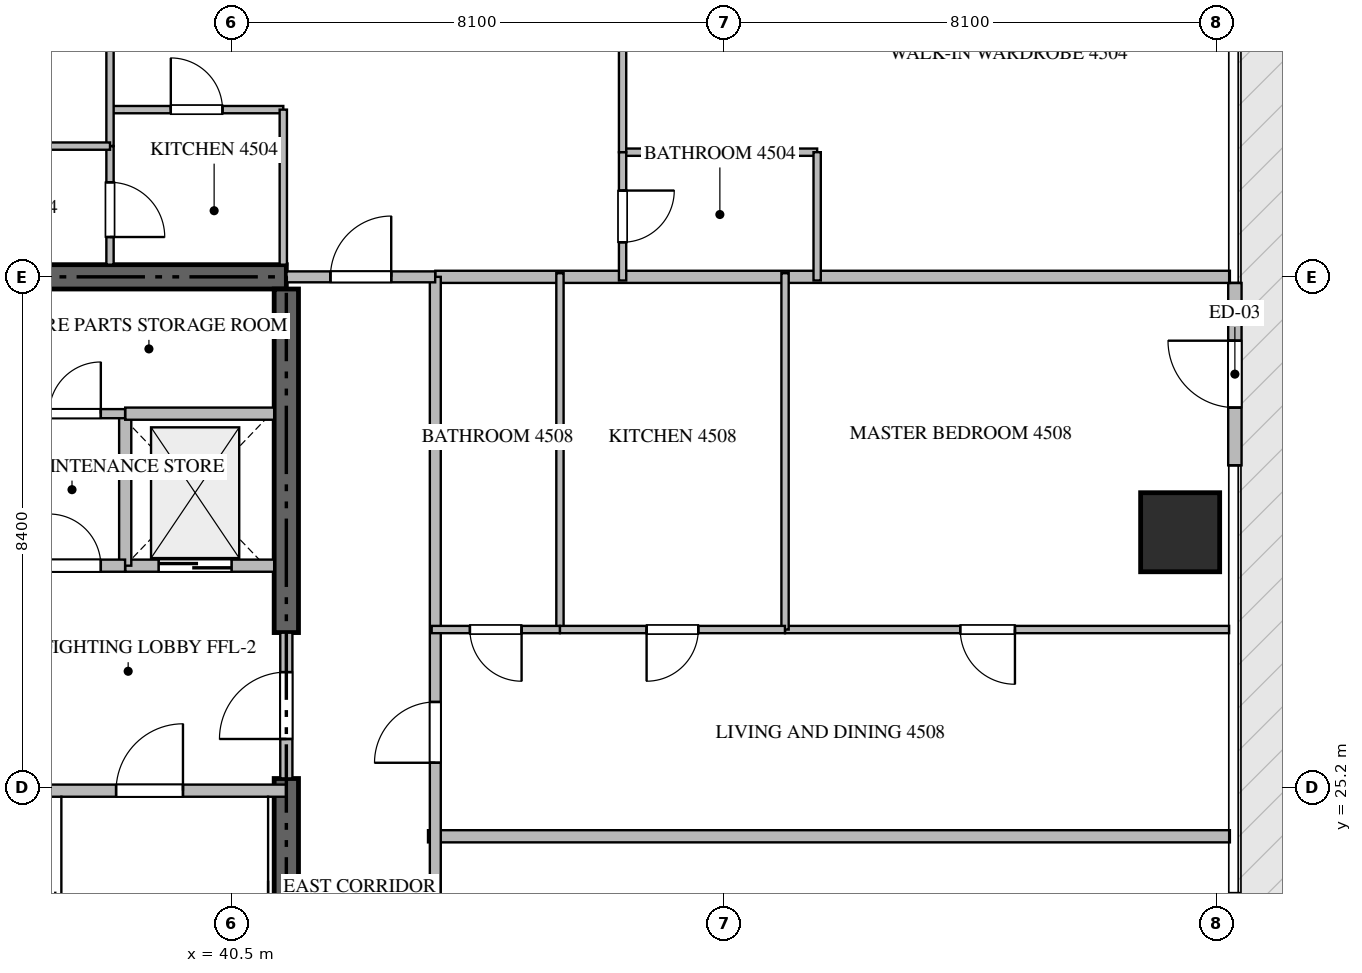
"""IFC4 building model, lengths in metres.
Left out: names, types, materials, properties, quantities, classifications, styles, units other than length and angle.
Written with IfcOpenShell. Run it as: python <this file> out.ifc"""

import sys

from ifc_helpers import new_model, si_unit, direction, frame, frame_2d, origin, origin_2d, place, context, subcontext, project, spatial, rectangle, extrude, source, transform, mapped, element, fill, save


model = new_model("IFC4")
c1 = context("Model", 3, precision=1e-05, world=origin(), true_north=direction((0.0, 1.0)))
c2 = subcontext(c1, "Body", "Model", "MODEL_VIEW")
j1 = project(units=[si_unit("LENGTHUNIT", "METRE"), si_unit("PLANEANGLEUNIT", "RADIAN")], contexts=[c1])
p1 = place(None, origin())
s1 = spatial("IfcSite", under=j1, at=p1, CompositionType="ELEMENT")
p2 = place(p1, origin())
s2 = spatial("IfcBuilding", under=s1, at=p2, CompositionType="ELEMENT")
p3 = place(p2, frame((0.0, 0.0, 180.15)))
s3 = spatial("IfcBuildingStorey", under=s2, at=p3, CompositionType="ELEMENT", Elevation=180.15)
p4 = place(p3, frame((41.4, 33.6, -0.26), z_axis=(0.0, 0.0, 1.0), x_axis=(-1.0, 0.0, 0.0)))
e1 = element("IfcWall", 1, at=p4, inside=s3, PredefinedType="SHEAR", context=c2, shape_type="SweptSolid", body=[
    extrude(rectangle(XDim=18.0, YDim=0.4, at=frame_2d((9.0, 0.0))), origin(), (0.0, 0.0, 1.0), 3.748),
])
p5 = place(p3, frame((41.4, 17.0, -0.26), z_axis=(0.0, 0.0, 1.0), x_axis=(0.0, 1.0, 0.0)))
e2 = element("IfcWall", 2, at=p5, inside=s3, PredefinedType="SHEAR", context=c2, shape_type="SweptSolid", body=[
    extrude(rectangle(XDim=8.35, YDim=0.4, at=frame_2d((4.175, 0.0))), origin(), (0.0, 0.0, 1.0), 3.748),
])
p6 = place(p3, frame((41.4, 27.75, -0.26), z_axis=(0.0, 0.0, 1.0), x_axis=(0.0, 1.0, 0.0)))
e3 = element("IfcWall", 3, at=p6, inside=s3, PredefinedType="SHEAR", context=c2, shape_type="SweptSolid", body=[
    extrude(rectangle(XDim=5.65, YDim=0.4, at=frame_2d((2.825, 0.0))), origin(), (0.0, 0.0, 1.0), 3.748),
])
m1 = source(origin(), c2, "Body", "SweptSolid", [
    extrude(rectangle(XDim=1.3, YDim=1.3, at=origin_2d()), origin(), (0.0, 0.0, 1.0), 3.75),
])
p7 = place(p3, frame((56.1, 29.4, -0.26), z_axis=(0.0, 0.0, 1.0), x_axis=(1.0, 0.0, 0.0)))
e4 = element("IfcColumn", 4, at=p7, inside=s3, PredefinedType="COLUMN", context=c2, shape_type="MappedRepresentation", body=[
    mapped(m1, transform((0.0, 0.0, 0.0), scale=1.0)),
])
p8 = place(p3, frame((57.0, 30.5, 0.0), z_axis=(0.0, 0.0, 1.0), x_axis=(0.0, 1.0, 0.0)))
e5 = element("IfcWall", 5, at=p8, inside=s3, PredefinedType="ELEMENTEDWALL", context=c2, shape_type="SweptSolid", body=[
    extrude(rectangle(XDim=3.0, YDim=0.22, at=frame_2d((1.5, 0.0))), origin(), (0.0, 0.0, 1.0), 3.475),
])
p9 = place(p8, frame((0.95, 0.0, 0.0)))
e6 = element("IfcOpeningElement", 6, at=p9, cuts=e5, PredefinedType="OPENING", context=c2, shape_type="SweptSolid", body=[
    extrude(rectangle(XDim=1.1, YDim=2.2, at=frame_2d((0.55, 1.1))), frame((0.0, 0.12, 0.0), z_axis=(0.0, -1.0, 0.0), x_axis=(1.0, 0.0, 0.0)), (0.0, 0.0, 1.0), 0.24),
])
p10 = place(p3, frame((36.95, 25.15, 0.0), z_axis=(0.0, 0.0, 1.0), x_axis=(1.0, 0.0, 0.0)))
e7 = element("IfcWall", 7, at=p10, inside=s3, PredefinedType="STANDARD", context=c2, shape_type="SweptSolid", body=[
    extrude(rectangle(XDim=4.45, YDim=0.2, at=frame_2d((2.225, 0.0))), origin(), (0.0, 0.0, 1.0), 3.49),
])
p11 = place(p10, frame((1.65, 0.0, 0.0)))
e8 = element("IfcOpeningElement", 8, at=p11, cuts=e7, PredefinedType="OPENING", context=c2, shape_type="SweptSolid", body=[
    extrude(rectangle(XDim=1.1, YDim=2.15, at=frame_2d((0.55, 1.075))), frame((0.0, 0.11, 0.0), z_axis=(0.0, -1.0, 0.0), x_axis=(1.0, 0.0, 0.0)), (0.0, 0.0, 1.0), 0.22),
])
p12 = place(p3, frame((38.75, 28.85, 0.0), z_axis=(0.0, 0.0, 1.0), x_axis=(1.0, 0.0, 0.0)))
e9 = element("IfcWall", 9, at=p12, inside=s3, PredefinedType="STANDARD", context=c2, shape_type="SweptSolid", body=[
    extrude(rectangle(XDim=2.45, YDim=0.2, at=frame_2d((1.225, 0.0))), origin(), (0.0, 0.0, 1.0), 3.49),
])
p13 = place(p12, frame((0.55, 0.0, 0.0)))
e10 = element("IfcOpeningElement", 10, at=p13, cuts=e9, PredefinedType="OPENING", context=c2, shape_type="SweptSolid", body=[
    extrude(rectangle(XDim=1.2, YDim=2.2, at=frame_2d((0.6, 1.1))), frame((0.0, 0.11, 0.0), z_axis=(0.0, -1.0, 0.0), x_axis=(1.0, 0.0, 0.0)), (0.0, 0.0, 1.0), 0.22),
])
p14 = place(p3, frame((38.75, 28.85, 0.0), z_axis=(0.0, 0.0, 1.0), x_axis=(0.0, 1.0, 0.0)))
e11 = element("IfcWall", 11, at=p14, inside=s3, PredefinedType="STANDARD", context=c2, shape_type="SweptSolid", body=[
    extrude(rectangle(XDim=2.5, YDim=0.2, at=frame_2d((1.25, 0.0))), origin(), (0.0, 0.0, 1.0), 3.49),
])
p15 = place(p3, frame((38.75, 31.35, 0.0), z_axis=(0.0, 0.0, 1.0), x_axis=(1.0, 0.0, 0.0)))
e12 = element("IfcWall", 12, at=p15, inside=s3, PredefinedType="STANDARD", context=c2, shape_type="SweptSolid", body=[
    extrude(rectangle(XDim=2.45, YDim=0.2, at=frame_2d((1.225, 0.0))), origin(), (0.0, 0.0, 1.0), 3.49),
])
p16 = place(p3, frame((37.1, 28.85, 0.0), z_axis=(0.0, 0.0, 1.0), x_axis=(1.0, 0.0, 0.0)))
e13 = element("IfcWall", 13, at=p16, inside=s3, PredefinedType="STANDARD", context=c2, shape_type="SweptSolid", body=[
    extrude(rectangle(XDim=1.648, YDim=0.2, at=frame_2d((0.824, 0.0))), origin(), (0.0, 0.0, 1.0), 3.49),
])
p17 = place(p16, frame((0.399, 0.0, 0.0)))
e14 = element("IfcOpeningElement", 14, at=p17, cuts=e13, PredefinedType="OPENING", context=c2, shape_type="SweptSolid", body=[
    extrude(rectangle(XDim=0.85, YDim=2.1, at=frame_2d((0.425, 1.05))), frame((0.0, 0.11, 0.0), z_axis=(0.0, -1.0, 0.0), x_axis=(1.0, 0.0, 0.0)), (0.0, 0.0, 1.0), 0.22),
])
p18 = place(p3, frame((41.4, 25.352, 0.0), z_axis=(0.0, 0.0, 1.0), x_axis=(0.0, 1.0, 0.0)))
e15 = element("IfcWall", 15, at=p18, inside=s3, PredefinedType="STANDARD", context=c2, shape_type="SweptSolid", body=[
    extrude(rectangle(XDim=2.396, YDim=0.2, at=frame_2d((1.198, 0.0))), origin(), (0.0, 0.0, 1.0), 3.49),
])
p19 = place(p18, frame((0.648, 0.0, 0.0)))
e16 = element("IfcOpeningElement", 16, at=p19, cuts=e15, PredefinedType="OPENING", context=c2, shape_type="SweptSolid", body=[
    extrude(rectangle(XDim=1.1, YDim=2.15, at=frame_2d((0.55, 1.075))), frame((0.0, 0.11, 0.0), z_axis=(0.0, -1.0, 0.0), x_axis=(1.0, 0.0, 0.0)), (0.0, 0.0, 1.0), 0.22),
])
p20 = place(p3, frame((37.1, 31.35, 0.0), z_axis=(0.0, 0.0, 1.0), x_axis=(1.0, 0.0, 0.0)))
e17 = element("IfcWall", 17, at=p20, inside=s3, PredefinedType="PARTITIONING", context=c2, shape_type="SweptSolid", body=[
    extrude(rectangle(XDim=1.648, YDim=0.15, at=frame_2d((0.824, 0.0))), origin(), (0.0, 0.0, 1.0), 3.49),
])
p21 = place(p20, frame((0.399, 0.0, 0.0)))
e18 = element("IfcOpeningElement", 18, at=p21, cuts=e17, PredefinedType="OPENING", context=c2, shape_type="SweptSolid", body=[
    extrude(rectangle(XDim=0.85, YDim=2.1, at=frame_2d((0.425, 1.05))), frame((0.0, 0.085, 0.0), z_axis=(0.0, -1.0, 0.0), x_axis=(1.0, 0.0, 0.0)), (0.0, 0.0, 1.0), 0.17),
])
p22 = place(p3, frame((43.73, 24.4, 0.0), z_axis=(0.0, 0.0, 1.0), x_axis=(1.0, 0.0, 0.0)))
e19 = element("IfcWall", 19, at=p22, inside=s3, PredefinedType="PARTITIONING", context=c2, shape_type="SweptSolid", body=[
    extrude(rectangle(XDim=13.188, YDim=0.2, at=frame_2d((6.594, 0.0))), origin(), (0.0, 0.0, 1.0), 3.49),
])
p23 = place(p3, frame((43.85, 33.6, 0.0), z_axis=(0.0, 0.0, 1.0), x_axis=(1.0, 0.0, 0.0)))
e20 = element("IfcWall", 20, at=p23, inside=s3, PredefinedType="PARTITIONING", context=c2, shape_type="SweptSolid", body=[
    extrude(rectangle(XDim=13.068, YDim=0.2, at=frame_2d((6.534, 0.0))), origin(), (0.0, 0.0, 1.0), 3.49),
])
p24 = place(p3, frame((43.85, 14.9, 0.0), z_axis=(0.0, 0.0, 1.0), x_axis=(0.0, 1.0, 0.0)))
e21 = element("IfcWall", 21, at=p24, inside=s3, PredefinedType="PARTITIONING", context=c2, shape_type="SweptSolid", body=[
    extrude(rectangle(XDim=18.7, YDim=0.18, at=frame_2d((9.35, 0.0))), origin(), (0.0, 0.0, 1.0), 3.49),
])
p25 = place(p24, frame((5.629, 0.0, 0.0)))
e22 = element("IfcOpeningElement", 22, at=p25, cuts=e21, PredefinedType="OPENING", context=c2, shape_type="SweptSolid", body=[
    extrude(rectangle(XDim=1.0, YDim=2.15, at=frame_2d((0.5, 1.075))), frame((0.0, 0.1, 0.0), z_axis=(0.0, -1.0, 0.0), x_axis=(1.0, 0.0, 0.0)), (0.0, 0.0, 1.0), 0.2),
])
p26 = place(p24, frame((10.709, 0.0, 0.0)))
e23 = element("IfcOpeningElement", 23, at=p26, cuts=e21, PredefinedType="OPENING", context=c2, shape_type="SweptSolid", body=[
    extrude(rectangle(XDim=1.0, YDim=2.15, at=frame_2d((0.5, 1.075))), frame((0.0, 0.1, 0.0), z_axis=(0.0, -1.0, 0.0), x_axis=(1.0, 0.0, 0.0)), (0.0, 0.0, 1.0), 0.2),
])
p27 = place(p3, frame((41.402, 33.6, 0.0), z_axis=(0.0, 0.0, 1.0), x_axis=(1.0, 0.0, 0.0)))
e24 = element("IfcWall", 24, at=p27, inside=s3, PredefinedType="PARTITIONING", context=c2, shape_type="SweptSolid", body=[
    extrude(rectangle(XDim=2.446, YDim=0.18, at=frame_2d((1.223, 0.0))), origin(), (0.0, 0.0, 1.0), 3.49),
])
p28 = place(p27, frame((0.723, 0.0, 0.0)))
e25 = element("IfcOpeningElement", 25, at=p28, cuts=e24, PredefinedType="OPENING", context=c2, shape_type="SweptSolid", body=[
    extrude(rectangle(XDim=1.0, YDim=2.15, at=frame_2d((0.5, 1.075))), frame((0.0, 0.1, 0.0), z_axis=(0.0, -1.0, 0.0), x_axis=(1.0, 0.0, 0.0)), (0.0, 0.0, 1.0), 0.2),
])
p29 = place(p3, frame((38.5, 36.35, 0.0), z_axis=(0.0, 0.0, 1.0), x_axis=(1.0, 0.0, 0.0)))
e26 = element("IfcWall", 26, at=p29, inside=s3, PredefinedType="PARTITIONING", context=c2, shape_type="SweptSolid", body=[
    extrude(rectangle(XDim=2.85, YDim=0.12, at=frame_2d((1.425, 0.0))), origin(), (0.0, 0.0, 1.0), 3.49),
])
p30 = place(p29, frame((1.0, 0.0, 0.0)))
e27 = element("IfcOpeningElement", 27, at=p30, cuts=e26, PredefinedType="OPENING", context=c2, shape_type="SweptSolid", body=[
    extrude(rectangle(XDim=0.85, YDim=2.1, at=frame_2d((0.425, 1.05))), frame((0.0, 0.07, 0.0), z_axis=(0.0, -1.0, 0.0), x_axis=(1.0, 0.0, 0.0)), (0.0, 0.0, 1.0), 0.14),
])
p31 = place(p3, frame((41.35, 36.35, 0.0), z_axis=(0.0, 0.0, 1.0), x_axis=(0.0, -1.0, 0.0)))
e28 = element("IfcWall", 28, at=p31, inside=s3, PredefinedType="PARTITIONING", context=c2, shape_type="SweptSolid", body=[
    extrude(rectangle(XDim=2.55, YDim=0.12, at=frame_2d((1.275, 0.0))), origin(), (0.0, 0.0, 1.0), 3.49),
])
p32 = place(p3, frame((38.5, 35.75, 0.0), z_axis=(0.0, 0.0, 1.0), x_axis=(0.0, -1.0, 0.0)))
e29 = element("IfcWall", 29, at=p32, inside=s3, PredefinedType="PARTITIONING", context=c2, shape_type="SweptSolid", body=[
    extrude(rectangle(XDim=1.95, YDim=0.12, at=frame_2d((0.975, 0.0))), origin(), (0.0, 0.0, 1.0), 3.49),
])
p33 = place(p32, frame((0.595, 0.0, 0.0)))
e30 = element("IfcOpeningElement", 30, at=p33, cuts=e29, PredefinedType="OPENING", context=c2, shape_type="SweptSolid", body=[
    extrude(rectangle(XDim=0.9, YDim=2.1, at=frame_2d((0.45, 1.05))), frame((0.0, 0.07, 0.0), z_axis=(0.0, -1.0, 0.0), x_axis=(1.0, 0.0, 0.0)), (0.0, 0.0, 1.0), 0.14),
])
p34 = place(p3, frame((38.5, 42.335, 0.0), z_axis=(0.0, 0.0, 1.0), x_axis=(0.0, -1.0, 0.0)))
e31 = element("IfcWall", 31, at=p34, inside=s3, PredefinedType="PARTITIONING", context=c2, shape_type="SweptSolid", body=[
    extrude(rectangle(XDim=6.583, YDim=0.12, at=frame_2d((3.292, 0.0))), origin(), (0.0, 0.0, 1.0), 3.49),
])
p35 = place(p3, frame((35.452, 35.75, 0.0), z_axis=(0.0, 0.0, 1.0), x_axis=(1.0, 0.0, 0.0)))
e32 = element("IfcWall", 32, at=p35, inside=s3, PredefinedType="PARTITIONING", context=c2, shape_type="SweptSolid", body=[
    extrude(rectangle(XDim=3.048, YDim=0.12, at=frame_2d((1.524, 0.0))), origin(), (0.0, 0.0, 1.0), 3.49),
])
p36 = place(p35, frame((1.099, 0.0, 0.0)))
e33 = element("IfcOpeningElement", 33, at=p36, cuts=e32, PredefinedType="OPENING", context=c2, shape_type="SweptSolid", body=[
    extrude(rectangle(XDim=0.85, YDim=2.1, at=frame_2d((0.425, 1.05))), frame((0.0, 0.07, 0.0), z_axis=(0.0, -1.0, 0.0), x_axis=(1.0, 0.0, 0.0)), (0.0, 0.0, 1.0), 0.14),
])
p37 = place(p3, frame((46.93, 35.65, 0.0), z_axis=(0.0, 0.0, 1.0), x_axis=(1.0, 0.0, 0.0)))
e34 = element("IfcWall", 34, at=p37, inside=s3, PredefinedType="PARTITIONING", context=c2, shape_type="SweptSolid", body=[
    extrude(rectangle(XDim=3.2, YDim=0.12, at=frame_2d((1.6, 0.0))), origin(), (0.0, 0.0, 1.0), 3.49),
])
p38 = place(p3, frame((50.13, 35.65, 0.0), z_axis=(0.0, 0.0, 1.0), x_axis=(0.0, -1.0, 0.0)))
e35 = element("IfcWall", 35, at=p38, inside=s3, PredefinedType="PARTITIONING", context=c2, shape_type="SweptSolid", body=[
    extrude(rectangle(XDim=2.11, YDim=0.12, at=frame_2d((1.055, 0.0))), origin(), (0.0, 0.0, 1.0), 3.49),
])
p39 = place(p3, frame((46.93, 41.073, 0.0), z_axis=(0.0, 0.0, 1.0), x_axis=(0.0, -1.0, 0.0)))
e36 = element("IfcWall", 36, at=p39, inside=s3, PredefinedType="PARTITIONING", context=c2, shape_type="SweptSolid", body=[
    extrude(rectangle(XDim=5.423, YDim=0.12, at=frame_2d((2.711, 0.0))), origin(), (0.0, 0.0, 1.0), 3.49),
])
p40 = place(p39, frame((2.287, 0.0, 0.0)))
e37 = element("IfcOpeningElement", 37, at=p40, cuts=e36, PredefinedType="OPENING", context=c2, shape_type="SweptSolid", body=[
    extrude(rectangle(XDim=0.85, YDim=2.1, at=frame_2d((0.425, 1.05))), frame((0.0, 0.07, 0.0), z_axis=(0.0, -1.0, 0.0), x_axis=(1.0, 0.0, 0.0)), (0.0, 0.0, 1.0), 0.14),
])
p41 = place(p3, frame((46.93, 35.648, 0.0), z_axis=(0.0, 0.0, 1.0), x_axis=(0.0, -1.0, 0.0)))
e38 = element("IfcWall", 38, at=p41, inside=s3, PredefinedType="PARTITIONING", context=c2, shape_type="SweptSolid", body=[
    extrude(rectangle(XDim=2.108, YDim=0.12, at=frame_2d((1.054, 0.0))), origin(), (0.0, 0.0, 1.0), 3.49),
])
p42 = place(p41, frame((0.629, 0.0, 0.0)))
e39 = element("IfcOpeningElement", 39, at=p42, cuts=e38, PredefinedType="OPENING", context=c2, shape_type="SweptSolid", body=[
    extrude(rectangle(XDim=0.85, YDim=2.1, at=frame_2d((0.425, 1.05))), frame((0.0, 0.07, 0.0), z_axis=(0.0, -1.0, 0.0), x_axis=(1.0, 0.0, 0.0)), (0.0, 0.0, 1.0), 0.14),
])
p43 = place(p3, frame((56.905, 27.8, 0.0), z_axis=(0.0, 0.0, 1.0), x_axis=(-1.0, 0.0, 0.0)))
e40 = element("IfcWall", 40, at=p43, inside=s3, PredefinedType="PARTITIONING", context=c2, shape_type="SweptSolid", body=[
    extrude(rectangle(XDim=7.303, YDim=0.12, at=frame_2d((3.651, 0.0))), origin(), (0.0, 0.0, 1.0), 3.49),
])
p44 = place(p43, frame((3.522, 0.0, 0.0)))
e41 = element("IfcOpeningElement", 41, at=p44, cuts=e40, PredefinedType="OPENING", context=c2, shape_type="SweptSolid", body=[
    extrude(rectangle(XDim=0.9, YDim=2.1, at=frame_2d((0.45, 1.05))), frame((0.0, 0.07, 0.0), z_axis=(0.0, -1.0, 0.0), x_axis=(1.0, 0.0, 0.0)), (0.0, 0.0, 1.0), 0.14),
])
for number, where, z_axis, x_axis in (
    (42, (49.602, 27.8, 0.0), (0.0, 0.0, 1.0), (0.0, 1.0, 0.0)),
    (43, (45.9, 27.8, 0.0), (0.0, 0.0, 1.0), (0.0, 1.0, 0.0)),
):
    element("IfcWall", number, at=place(p3, frame(where, z_axis=z_axis, x_axis=x_axis)), inside=s3, PredefinedType="PARTITIONING", context=c2, shape_type="SweptSolid", body=[
        extrude(rectangle(XDim=5.86, YDim=0.12, at=frame_2d((2.93, 0.0))), origin(), (0.0, 0.0, 1.0), 3.49),
    ])
p45 = place(p3, frame((49.6, 27.8, 0.0), z_axis=(0.0, 0.0, 1.0), x_axis=(-1.0, 0.0, 0.0)))
e44 = element("IfcWall", 44, at=p45, inside=s3, PredefinedType="PARTITIONING", context=c2, shape_type="SweptSolid", body=[
    extrude(rectangle(XDim=3.7, YDim=0.12, at=frame_2d((1.85, 0.0))), origin(), (0.0, 0.0, 1.0), 3.49),
])
p46 = place(p45, frame((1.425, 0.0, 0.0)))
e45 = element("IfcOpeningElement", 45, at=p46, cuts=e44, PredefinedType="OPENING", context=c2, shape_type="SweptSolid", body=[
    extrude(rectangle(XDim=0.85, YDim=2.1, at=frame_2d((0.425, 1.05))), frame((0.0, 0.07, 0.0), z_axis=(0.0, -1.0, 0.0), x_axis=(1.0, 0.0, 0.0)), (0.0, 0.0, 1.0), 0.14),
])
p47 = place(p3, frame((45.898, 27.8, 0.0), z_axis=(0.0, 0.0, 1.0), x_axis=(-1.0, 0.0, 0.0)))
e46 = element("IfcWall", 46, at=p47, inside=s3, PredefinedType="PARTITIONING", context=c2, shape_type="SweptSolid", body=[
    extrude(rectangle(XDim=2.108, YDim=0.12, at=frame_2d((1.054, 0.0))), origin(), (0.0, 0.0, 1.0), 3.49),
])
p48 = place(p47, frame((0.629, 0.0, 0.0)))
e47 = element("IfcOpeningElement", 47, at=p48, cuts=e46, PredefinedType="OPENING", context=c2, shape_type="SweptSolid", body=[
    extrude(rectangle(XDim=0.85, YDim=2.1, at=frame_2d((0.425, 1.05))), frame((0.0, 0.07, 0.0), z_axis=(0.0, -1.0, 0.0), x_axis=(1.0, 0.0, 0.0)), (0.0, 0.0, 1.0), 0.14),
])
m2 = source(origin(), c2, "Body", "SweptSolid", [
    extrude(rectangle(XDim=1.1, YDim=2.2, at=frame_2d((0.55, 1.1))), frame((0.0, 0.025, 0.0), z_axis=(0.0, -1.0, 0.0), x_axis=(1.0, 0.0, 0.0)), (0.0, 0.0, 1.0), 0.05),
])
p49 = place(p9, origin())
e48 = element("IfcDoor", 48, at=p49, inside=s3, OperationType="SINGLE_SWING_RIGHT", PredefinedType="DOOR", context=c2, shape_type="MappedRepresentation", body=[
    mapped(m2, transform((0.0, 0.0, 0.0), scale=1.0)),
])
fill(e6, e48)
m3 = source(origin(), c2, "Body", "SweptSolid", [
    extrude(rectangle(XDim=1.1, YDim=2.15, at=frame_2d((0.55, 1.075))), frame((0.0, 0.025, 0.0), z_axis=(0.0, -1.0, 0.0), x_axis=(1.0, 0.0, 0.0)), (0.0, 0.0, 1.0), 0.05),
])
p50 = place(p11, origin())
e49 = element("IfcDoor", 49, at=p50, inside=s3, OperationType="SINGLE_SWING_RIGHT", PredefinedType="DOOR", context=c2, shape_type="MappedRepresentation", body=[
    mapped(m3, transform((0.0, 0.0, 0.0), scale=1.0)),
])
fill(e8, e49)
m4 = source(origin(), c2, "Body", "SweptSolid", [
    extrude(rectangle(XDim=1.2, YDim=2.2, at=frame_2d((0.6, 1.1))), frame((0.0, 0.025, 0.0), z_axis=(0.0, -1.0, 0.0), x_axis=(1.0, 0.0, 0.0)), (0.0, 0.0, 1.0), 0.05),
])
p51 = place(p13, origin())
e50 = element("IfcDoor", 50, at=p51, inside=s3, OperationType="DOUBLE_DOOR_SLIDING", PredefinedType="DOOR", context=c2, shape_type="MappedRepresentation", body=[
    mapped(m4, transform((0.0, 0.0, 0.0), scale=1.0)),
])
fill(e10, e50)
m5 = source(origin(), c2, "Body", "SweptSolid", [
    extrude(rectangle(XDim=0.85, YDim=2.1, at=frame_2d((0.425, 1.05))), frame((0.0, 0.025, 0.0), z_axis=(0.0, -1.0, 0.0), x_axis=(1.0, 0.0, 0.0)), (0.0, 0.0, 1.0), 0.05),
])
p52 = place(p17, origin())
e51 = element("IfcDoor", 51, at=p52, inside=s3, OperationType="SINGLE_SWING_LEFT", PredefinedType="DOOR", context=c2, shape_type="MappedRepresentation", body=[
    mapped(m5, transform((0.0, 0.0, 0.0), scale=1.0)),
])
fill(e14, e51)
p53 = place(p19, origin())
e52 = element("IfcDoor", 52, at=p53, inside=s3, OperationType="SINGLE_SWING_LEFT", PredefinedType="DOOR", context=c2, shape_type="MappedRepresentation", body=[
    mapped(m3, transform((0.0, 0.0, 0.0), scale=1.0)),
])
fill(e16, e52)
p54 = place(p21, origin())
e53 = element("IfcDoor", 53, at=p54, inside=s3, OperationType="SINGLE_SWING_RIGHT", PredefinedType="DOOR", context=c2, shape_type="MappedRepresentation", body=[
    mapped(m5, transform((0.0, 0.0, 0.0), scale=1.0)),
])
fill(e18, e53)
m6 = source(origin(), c2, "Body", "SweptSolid", [
    extrude(rectangle(XDim=1.0, YDim=2.15, at=frame_2d((0.5, 1.075))), frame((0.0, 0.025, 0.0), z_axis=(0.0, -1.0, 0.0), x_axis=(1.0, 0.0, 0.0)), (0.0, 0.0, 1.0), 0.05),
])
p55 = place(p26, origin())
e54 = element("IfcDoor", 54, at=p55, inside=s3, OperationType="SINGLE_SWING_LEFT", PredefinedType="DOOR", context=c2, shape_type="MappedRepresentation", body=[
    mapped(m6, transform((0.0, 0.0, 0.0), scale=1.0)),
])
fill(e23, e54)
p56 = place(p28, origin())
e55 = element("IfcDoor", 55, at=p56, inside=s3, OperationType="SINGLE_SWING_RIGHT", PredefinedType="DOOR", context=c2, shape_type="MappedRepresentation", body=[
    mapped(m6, transform((0.0, 0.0, 0.0), scale=1.0)),
])
fill(e25, e55)
p57 = place(p30, origin())
e56 = element("IfcDoor", 56, at=p57, inside=s3, OperationType="SINGLE_SWING_LEFT", PredefinedType="DOOR", context=c2, shape_type="MappedRepresentation", body=[
    mapped(m5, transform((0.0, 0.0, 0.0), scale=1.0)),
])
fill(e27, e56)
m7 = source(origin(), c2, "Body", "SweptSolid", [
    extrude(rectangle(XDim=0.9, YDim=2.1, at=frame_2d((0.45, 1.05))), frame((0.0, 0.025, 0.0), z_axis=(0.0, -1.0, 0.0), x_axis=(1.0, 0.0, 0.0)), (0.0, 0.0, 1.0), 0.05),
])
p58 = place(p33, origin())
e57 = element("IfcDoor", 57, at=p58, inside=s3, OperationType="SINGLE_SWING_RIGHT", PredefinedType="DOOR", context=c2, shape_type="MappedRepresentation", body=[
    mapped(m7, transform((0.0, 0.0, 0.0), scale=1.0)),
])
fill(e30, e57)
p59 = place(p42, origin())
e58 = element("IfcDoor", 58, at=p59, inside=s3, OperationType="SINGLE_SWING_LEFT", PredefinedType="DOOR", context=c2, shape_type="MappedRepresentation", body=[
    mapped(m5, transform((0.0, 0.0, 0.0), scale=1.0)),
])
fill(e39, e58)
p60 = place(p44, origin())
e59 = element("IfcDoor", 59, at=p60, inside=s3, OperationType="SINGLE_SWING_LEFT", PredefinedType="DOOR", context=c2, shape_type="MappedRepresentation", body=[
    mapped(m7, transform((0.0, 0.0, 0.0), scale=1.0)),
])
fill(e41, e59)
p61 = place(p46, origin())
e60 = element("IfcDoor", 60, at=p61, inside=s3, OperationType="SINGLE_SWING_RIGHT", PredefinedType="DOOR", context=c2, shape_type="MappedRepresentation", body=[
    mapped(m5, transform((0.0, 0.0, 0.0), scale=1.0)),
])
fill(e45, e60)
p62 = place(p48, origin())
e61 = element("IfcDoor", 61, at=p62, inside=s3, OperationType="SINGLE_SWING_LEFT", PredefinedType="DOOR", context=c2, shape_type="MappedRepresentation", body=[
    mapped(m5, transform((0.0, 0.0, 0.0), scale=1.0)),
])
fill(e47, e61)
save(model, sys.argv[1])
